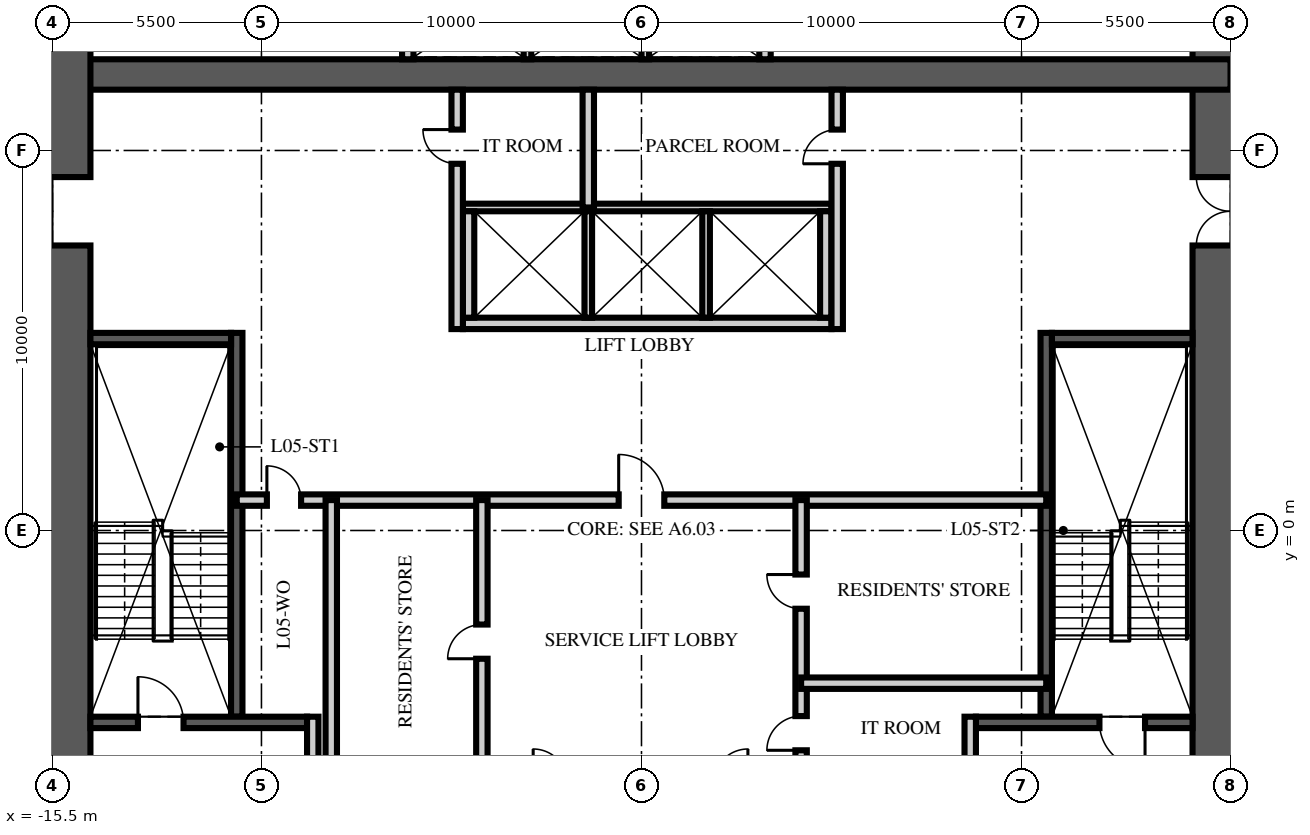
"""IFC4 building model, lengths in metres.
Left out: names, types, materials, properties, quantities, classifications, styles, units other than length and angle.
Written with IfcOpenShell. Run it as: python <this file> out.ifc"""

import sys

from ifc_helpers import new_model, si_unit, direction, frame, frame_2d, origin, place, context, subcontext, project, spatial, rectangle, extrude, element, fill, save


model = new_model("IFC4")
c1 = context("Model", 3, precision=1e-05, world=origin(), true_north=direction((0.0, 1.0)))
c2 = subcontext(c1, "Body", "Model", "MODEL_VIEW")
j1 = project(units=[si_unit("LENGTHUNIT", "METRE"), si_unit("PLANEANGLEUNIT", "RADIAN")], contexts=[c1])
p1 = place(None, origin())
s1 = spatial("IfcSite", under=j1, at=p1, CompositionType="ELEMENT")
p2 = place(p1, origin())
s2 = spatial("IfcBuilding", under=s1, at=p2, CompositionType="ELEMENT")
p3 = place(p2, frame((0.0, 0.0, 24.75)))
s3 = spatial("IfcBuildingStorey", under=s2, at=p3, CompositionType="ELEMENT", Elevation=24.75)
p4 = place(p3, frame((15.5, -15.5, -0.25), z_axis=(0.0, 0.0, 1.0), x_axis=(0.0, 1.0, 0.0)))
e1 = element("IfcWall", 1, at=p4, inside=s3, PredefinedType="SHEAR", context=c2, shape_type="SweptSolid", body=[
    extrude(rectangle(XDim=31.0, YDim=2.0, at=frame_2d((15.5, 0.0))), origin(), (0.0, 0.0, 1.0), 3.75),
])
p5 = place(p4, frame((6.5, 0.0, 0.25)))
e2 = element("IfcOpeningElement", 2, at=p5, cuts=e1, PredefinedType="OPENING", context=c2, shape_type="SweptSolid", body=[
    extrude(rectangle(XDim=1.2, YDim=2.1, at=frame_2d((0.6, 1.05))), frame((0.0, 1.01, 0.0), z_axis=(0.0, -1.0, 0.0), x_axis=(1.0, 0.0, 0.0)), (0.0, 0.0, 1.0), 2.02),
])
p6 = place(p4, frame((23.0, 0.0, 0.25)))
e3 = element("IfcOpeningElement", 3, at=p6, cuts=e1, PredefinedType="OPENING", context=c2, shape_type="SweptSolid", body=[
    extrude(rectangle(XDim=1.8, YDim=2.1, at=frame_2d((0.9, 1.05))), frame((0.0, 1.01, 0.0), z_axis=(0.0, -1.0, 0.0), x_axis=(1.0, 0.0, 0.0)), (0.0, 0.0, 1.0), 2.02),
])
p7 = place(p3, frame((-15.5, 12.0, -0.25), z_axis=(0.0, 0.0, 1.0), x_axis=(1.0, 0.0, 0.0)))
e4 = element("IfcWall", 4, at=p7, inside=s3, PredefinedType="SHEAR", context=c2, shape_type="SweptSolid", body=[
    extrude(rectangle(XDim=31.0, YDim=0.8, at=frame_2d((15.5, 0.0))), origin(), (0.0, 0.0, 1.0), 3.75),
])
p8 = place(p3, frame((-15.5, -15.5, -0.25), z_axis=(0.0, 0.0, 1.0), x_axis=(0.0, 1.0, 0.0)))
e5 = element("IfcWall", 5, at=p8, inside=s3, PredefinedType="SHEAR", context=c2, shape_type="SweptSolid", body=[
    extrude(rectangle(XDim=31.0, YDim=2.0, at=frame_2d((15.5, 0.0))), origin(), (0.0, 0.0, 1.0), 3.75),
])
p9 = place(p8, frame((6.5, 0.0, 0.25)))
e6 = element("IfcOpeningElement", 6, at=p9, cuts=e5, PredefinedType="OPENING", context=c2, shape_type="SweptSolid", body=[
    extrude(rectangle(XDim=1.2, YDim=2.1, at=frame_2d((0.6, 1.05))), frame((0.0, 1.01, 0.0), z_axis=(0.0, -1.0, 0.0), x_axis=(1.0, 0.0, 0.0)), (0.0, 0.0, 1.0), 2.02),
])
p10 = place(p8, frame((23.0, 0.0, 0.25)))
e7 = element("IfcOpeningElement", 7, at=p10, cuts=e5, PredefinedType="OPENING", context=c2, shape_type="SweptSolid", body=[
    extrude(rectangle(XDim=1.8, YDim=2.1, at=frame_2d((0.9, 1.05))), frame((0.0, 1.01, 0.0), z_axis=(0.0, -1.0, 0.0), x_axis=(1.0, 0.0, 0.0)), (0.0, 0.0, 1.0), 2.02),
])
p11 = place(p3, frame((-10.65, -4.9, 0.0), z_axis=(0.0, 0.0, 1.0), x_axis=(0.0, 1.0, 0.0)))
e8 = element("IfcWall", 8, at=p11, inside=s3, PredefinedType="SOLIDWALL", context=c2, shape_type="SweptSolid", body=[
    extrude(rectangle(XDim=10.1, YDim=0.3, at=frame_2d((5.05, 0.0))), origin(), (0.0, 0.0, 1.0), 3.5),
])
p12 = place(p3, frame((-14.5, -5.05, 0.0), z_axis=(0.0, 0.0, 1.0), x_axis=(1.0, 0.0, 0.0)))
e9 = element("IfcWall", 9, at=p12, inside=s3, PredefinedType="SOLIDWALL", context=c2, shape_type="SweptSolid", body=[
    extrude(rectangle(XDim=5.7, YDim=0.3, at=frame_2d((2.85, 0.0))), origin(), (0.0, 0.0, 1.0), 3.5),
])
p13 = place(p12, frame((1.25, 0.0, 0.0)))
e10 = element("IfcOpeningElement", 10, at=p13, cuts=e9, PredefinedType="OPENING", context=c2, shape_type="SweptSolid", body=[
    extrude(rectangle(XDim=1.2, YDim=2.1, at=frame_2d((0.6, 1.05))), frame((0.0, 0.16, 0.0), z_axis=(0.0, -1.0, 0.0), x_axis=(1.0, 0.0, 0.0)), (0.0, 0.0, 1.0), 0.32),
])
p14 = place(p3, frame((-14.5, 5.05, 0.0), z_axis=(0.0, 0.0, 1.0), x_axis=(1.0, 0.0, 0.0)))
e11 = element("IfcWall", 11, at=p14, inside=s3, PredefinedType="SOLIDWALL", context=c2, shape_type="SweptSolid", body=[
    extrude(rectangle(XDim=3.7, YDim=0.3, at=frame_2d((1.85, 0.0))), origin(), (0.0, 0.0, 1.0), 3.5),
])
p15 = place(p3, frame((-8.65, -11.6, 0.0), z_axis=(0.0, 0.0, 1.0), x_axis=(0.0, 1.0, 0.0)))
e12 = element("IfcWall", 12, at=p15, inside=s3, PredefinedType="PARTITIONING", context=c2, shape_type="SweptSolid", body=[
    extrude(rectangle(XDim=6.7, YDim=0.3, at=frame_2d((3.35, 0.0))), origin(), (0.0, 0.0, 1.0), 3.5),
])
p16 = place(p15, frame((2.85, 0.0, 0.0)))
e13 = element("IfcOpeningElement", 13, at=p16, cuts=e12, PredefinedType="OPENING", context=c2, shape_type="SweptSolid", body=[
    extrude(rectangle(XDim=1.1, YDim=2.1, at=frame_2d((0.55, 1.05))), frame((0.0, 0.16, 0.0), z_axis=(0.0, -1.0, 0.0), x_axis=(1.0, 0.0, 0.0)), (0.0, 0.0, 1.0), 0.32),
])
p17 = place(p3, frame((10.65, -4.9, 0.0), z_axis=(0.0, 0.0, 1.0), x_axis=(0.0, 1.0, 0.0)))
e14 = element("IfcWall", 14, at=p17, inside=s3, PredefinedType="SOLIDWALL", context=c2, shape_type="SweptSolid", body=[
    extrude(rectangle(XDim=10.1, YDim=0.3, at=frame_2d((5.05, 0.0))), origin(), (0.0, 0.0, 1.0), 3.5),
])
p18 = place(p3, frame((14.5, -5.05, 0.0), z_axis=(0.0, 0.0, 1.0), x_axis=(-1.0, 0.0, 0.0)))
e15 = element("IfcWall", 15, at=p18, inside=s3, PredefinedType="SOLIDWALL", context=c2, shape_type="SweptSolid", body=[
    extrude(rectangle(XDim=5.7, YDim=0.3, at=frame_2d((2.85, 0.0))), origin(), (0.0, 0.0, 1.0), 3.5),
])
p19 = place(p18, frame((1.25, 0.0, 0.0)))
e16 = element("IfcOpeningElement", 16, at=p19, cuts=e15, PredefinedType="OPENING", context=c2, shape_type="SweptSolid", body=[
    extrude(rectangle(XDim=1.2, YDim=2.1, at=frame_2d((0.6, 1.05))), frame((0.0, 0.16, 0.0), z_axis=(0.0, -1.0, 0.0), x_axis=(1.0, 0.0, 0.0)), (0.0, 0.0, 1.0), 0.32),
])
p20 = place(p3, frame((14.5, 5.05, 0.0), z_axis=(0.0, 0.0, 1.0), x_axis=(-1.0, 0.0, 0.0)))
e17 = element("IfcWall", 17, at=p20, inside=s3, PredefinedType="SOLIDWALL", context=c2, shape_type="SweptSolid", body=[
    extrude(rectangle(XDim=3.7, YDim=0.3, at=frame_2d((1.85, 0.0))), origin(), (0.0, 0.0, 1.0), 3.5),
])
p21 = place(p3, frame((8.65, -11.6, 0.0), z_axis=(0.0, 0.0, 1.0), x_axis=(0.0, 1.0, 0.0)))
e18 = element("IfcWall", 18, at=p21, inside=s3, PredefinedType="PARTITIONING", context=c2, shape_type="SweptSolid", body=[
    extrude(rectangle(XDim=6.7, YDim=0.3, at=frame_2d((3.35, 0.0))), origin(), (0.0, 0.0, 1.0), 3.5),
])
p22 = place(p21, frame((2.85, 0.0, 0.0)))
e19 = element("IfcOpeningElement", 19, at=p22, cuts=e18, PredefinedType="OPENING", context=c2, shape_type="SweptSolid", body=[
    extrude(rectangle(XDim=1.1, YDim=2.1, at=frame_2d((0.55, 1.05))), frame((0.0, 0.16, 0.0), z_axis=(0.0, -1.0, 0.0), x_axis=(1.0, 0.0, 0.0)), (0.0, 0.0, 1.0), 0.32),
])
p23 = place(p3, frame((-4.7, 5.45, 0.0), z_axis=(0.0, 0.0, 1.0), x_axis=(1.0, 0.0, 0.0)))
e20 = element("IfcWall", 20, at=p23, inside=s3, PredefinedType="PARTITIONING", context=c2, shape_type="SweptSolid", body=[
    extrude(rectangle(XDim=9.7, YDim=0.3, at=frame_2d((4.85, 0.0))), origin(), (0.0, 0.0, 1.0), 3.5),
])
p24 = place(p3, frame((-4.7, 8.5, 0.0), z_axis=(0.0, 0.0, 1.0), x_axis=(1.0, 0.0, 0.0)))
e21 = element("IfcWall", 21, at=p24, inside=s3, PredefinedType="PARTITIONING", context=c2, shape_type="SweptSolid", body=[
    extrude(rectangle(XDim=9.7, YDim=0.2, at=frame_2d((4.85, 0.0))), origin(), (0.0, 0.0, 1.0), 3.5),
])
for number, where, z_axis, x_axis in (
    (22, (-4.55, 5.6, 0.0), (0.0, 0.0, 1.0), (0.0, 1.0, 0.0)),
    (23, (4.85, 5.6, 0.0), (0.0, 0.0, 1.0), (0.0, 1.0, 0.0)),
):
    element("IfcWall", number, at=place(p3, frame(where, z_axis=z_axis, x_axis=x_axis)), inside=s3, PredefinedType="PARTITIONING", context=c2, shape_type="SweptSolid", body=[
        extrude(rectangle(XDim=2.8, YDim=0.3, at=frame_2d((1.4, 0.0))), origin(), (0.0, 0.0, 1.0), 3.5),
    ])
for number, where, z_axis, x_axis in (
    (24, (-1.4, 5.6, 0.0), (0.0, 0.0, 1.0), (0.0, 1.0, 0.0)),
    (25, (1.7, 5.6, 0.0), (0.0, 0.0, 1.0), (0.0, 1.0, 0.0)),
):
    element("IfcWall", number, at=place(p3, frame(where, z_axis=z_axis, x_axis=x_axis)), inside=s3, PredefinedType="PARTITIONING", context=c2, shape_type="SweptSolid", body=[
        extrude(rectangle(XDim=2.8, YDim=0.2, at=frame_2d((1.4, 0.0))), origin(), (0.0, 0.0, 1.0), 3.5),
    ])
for number, where, z_axis, x_axis in (
    (26, (-6.15, 12.4, 0.0), (0.0, 0.0, 1.0), (0.0, 1.0, 0.0)),
    (27, (3.25, 12.4, 0.0), (0.0, 0.0, 1.0), (0.0, 1.0, 0.0)),
):
    element("IfcWall", number, at=place(p3, frame(where, z_axis=z_axis, x_axis=x_axis)), inside=s3, PredefinedType="PARTITIONING", context=c2, shape_type="SweptSolid", body=[
        extrude(rectangle(XDim=2.1, YDim=0.3, at=frame_2d((1.05, 0.0))), origin(), (0.0, 0.0, 1.0), 3.5),
    ])
for number, where, z_axis, x_axis in (
    (28, (-3.0, 12.4, 0.0), (0.0, 0.0, 1.0), (0.0, 1.0, 0.0)),
    (29, (0.1, 12.4, 0.0), (0.0, 0.0, 1.0), (0.0, 1.0, 0.0)),
):
    element("IfcWall", number, at=place(p3, frame(where, z_axis=z_axis, x_axis=x_axis)), inside=s3, PredefinedType="PARTITIONING", context=c2, shape_type="SweptSolid", body=[
        extrude(rectangle(XDim=2.1, YDim=0.2, at=frame_2d((1.05, 0.0))), origin(), (0.0, 0.0, 1.0), 3.5),
    ])
p25 = place(p3, frame((-10.65, 0.8, 0.0), z_axis=(0.0, 0.0, 1.0), x_axis=(1.0, 0.0, 0.0)))
e30 = element("IfcWall", 30, at=p25, inside=s3, PredefinedType="PARTITIONING", context=c2, shape_type="SweptSolid", body=[
    extrude(rectangle(XDim=21.3, YDim=0.3, at=frame_2d((10.65, 0.0))), origin(), (0.0, 0.0, 1.0), 3.5),
])
p26 = place(p25, frame((10.05, 0.0, 0.0)))
e31 = element("IfcOpeningElement", 31, at=p26, cuts=e30, PredefinedType="OPENING", context=c2, shape_type="SweptSolid", body=[
    extrude(rectangle(XDim=1.2, YDim=2.1, at=frame_2d((0.6, 1.05))), frame((0.0, 0.16, 0.0), z_axis=(0.0, -1.0, 0.0), x_axis=(1.0, 0.0, 0.0)), (0.0, 0.0, 1.0), 0.32),
])
p27 = place(p25, frame((0.793, 0.0, 0.0)))
e32 = element("IfcOpeningElement", 32, at=p27, cuts=e30, PredefinedType="OPENING", context=c2, shape_type="SweptSolid", body=[
    extrude(rectangle(XDim=0.9, YDim=2.1, at=frame_2d((0.45, 1.05))), frame((0.0, 0.16, 0.0), z_axis=(0.0, -1.0, 0.0), x_axis=(1.0, 0.0, 0.0)), (0.0, 0.0, 1.0), 0.32),
])
p28 = place(p3, frame((-4.2, -6.65, 0.0), z_axis=(0.0, 0.0, 1.0), x_axis=(0.0, 1.0, 0.0)))
e33 = element("IfcWall", 33, at=p28, inside=s3, PredefinedType="PARTITIONING", context=c2, shape_type="SweptSolid", body=[
    extrude(rectangle(XDim=7.45, YDim=0.3, at=frame_2d((3.725, 0.0))), origin(), (0.0, 0.0, 1.0), 3.5),
])
p29 = place(p28, frame((3.275, 0.0, 0.0)))
e34 = element("IfcOpeningElement", 34, at=p29, cuts=e33, PredefinedType="OPENING", context=c2, shape_type="SweptSolid", body=[
    extrude(rectangle(XDim=0.9, YDim=2.1, at=frame_2d((0.45, 1.05))), frame((0.0, 0.16, 0.0), z_axis=(0.0, -1.0, 0.0), x_axis=(1.0, 0.0, 0.0)), (0.0, 0.0, 1.0), 0.32),
])
p30 = place(p3, frame((4.2, -6.65, 0.0), z_axis=(0.0, 0.0, 1.0), x_axis=(0.0, 1.0, 0.0)))
e35 = element("IfcWall", 35, at=p30, inside=s3, PredefinedType="PARTITIONING", context=c2, shape_type="SweptSolid", body=[
    extrude(rectangle(XDim=7.45, YDim=0.3, at=frame_2d((3.725, 0.0))), origin(), (0.0, 0.0, 1.0), 3.5),
])
p31 = place(p30, frame((0.866, 0.0, 0.0)))
e36 = element("IfcOpeningElement", 36, at=p31, cuts=e35, PredefinedType="OPENING", context=c2, shape_type="SweptSolid", body=[
    extrude(rectangle(XDim=0.9, YDim=2.1, at=frame_2d((0.45, 1.05))), frame((0.0, 0.16, 0.0), z_axis=(0.0, -1.0, 0.0), x_axis=(1.0, 0.0, 0.0)), (0.0, 0.0, 1.0), 0.32),
])
p32 = place(p30, frame((4.591, 0.0, 0.0)))
e37 = element("IfcOpeningElement", 37, at=p32, cuts=e35, PredefinedType="OPENING", context=c2, shape_type="SweptSolid", body=[
    extrude(rectangle(XDim=0.9, YDim=2.1, at=frame_2d((0.45, 1.05))), frame((0.0, 0.16, 0.0), z_axis=(0.0, -1.0, 0.0), x_axis=(1.0, 0.0, 0.0)), (0.0, 0.0, 1.0), 0.32),
])
p33 = place(p3, frame((-8.163, -6.65, 0.0), z_axis=(0.0, 0.0, 1.0), x_axis=(0.0, 1.0, 0.0)))
e38 = element("IfcWall", 38, at=p33, inside=s3, PredefinedType="PARTITIONING", context=c2, shape_type="SweptSolid", body=[
    extrude(rectangle(XDim=7.45, YDim=0.3, at=frame_2d((3.725, 0.0))), origin(), (0.0, 0.0, 1.0), 3.5),
])
p34 = place(p3, frame((10.65, -4.018, 0.0), z_axis=(0.0, 0.0, 1.0), x_axis=(-1.0, 0.0, 0.0)))
e39 = element("IfcWall", 39, at=p34, inside=s3, PredefinedType="PARTITIONING", context=c2, shape_type="SweptSolid", body=[
    extrude(rectangle(XDim=6.45, YDim=0.3, at=frame_2d((3.225, 0.0))), origin(), (0.0, 0.0, 1.0), 3.5),
])
p35 = place(p3, frame((-4.85, 5.3, 0.0), z_axis=(0.0, 0.0, 1.0), x_axis=(0.0, 1.0, 0.0)))
e40 = element("IfcWall", 40, at=p35, inside=s3, PredefinedType="PARTITIONING", context=c2, shape_type="SweptSolid", body=[
    extrude(rectangle(XDim=6.3, YDim=0.3, at=frame_2d((3.15, 0.0))), origin(), (0.0, 0.0, 1.0), 3.5),
])
p36 = place(p35, frame((4.35, 0.0, 0.0)))
e41 = element("IfcOpeningElement", 41, at=p36, cuts=e40, PredefinedType="OPENING", context=c2, shape_type="SweptSolid", body=[
    extrude(rectangle(XDim=0.9, YDim=2.1, at=frame_2d((0.45, 1.05))), frame((0.0, 0.16, 0.0), z_axis=(0.0, -1.0, 0.0), x_axis=(1.0, 0.0, 0.0)), (0.0, 0.0, 1.0), 0.32),
])
p37 = place(p3, frame((5.15, 5.3, 0.0), z_axis=(0.0, 0.0, 1.0), x_axis=(0.0, 1.0, 0.0)))
e42 = element("IfcWall", 42, at=p37, inside=s3, PredefinedType="PARTITIONING", context=c2, shape_type="SweptSolid", body=[
    extrude(rectangle(XDim=6.3, YDim=0.3, at=frame_2d((3.15, 0.0))), origin(), (0.0, 0.0, 1.0), 3.5),
])
p38 = place(p37, frame((4.35, 0.0, 0.0)))
e43 = element("IfcOpeningElement", 43, at=p38, cuts=e42, PredefinedType="OPENING", context=c2, shape_type="SweptSolid", body=[
    extrude(rectangle(XDim=0.9, YDim=2.1, at=frame_2d((0.45, 1.05))), frame((0.0, 0.16, 0.0), z_axis=(0.0, -1.0, 0.0), x_axis=(1.0, 0.0, 0.0)), (0.0, 0.0, 1.0), 0.32),
])
p39 = place(p3, frame((-1.4, 8.5, 0.0), z_axis=(0.0, 0.0, 1.0), x_axis=(0.0, 1.0, 0.0)))
e44 = element("IfcWall", 44, at=p39, inside=s3, PredefinedType="PARTITIONING", context=c2, shape_type="SweptSolid", body=[
    extrude(rectangle(XDim=3.1, YDim=0.3, at=frame_2d((1.55, 0.0))), origin(), (0.0, 0.0, 1.0), 3.5),
])
p40 = place(p13, origin())
e45 = element("IfcDoor", 45, at=p40, inside=s3, OperationType="SINGLE_SWING_LEFT", PredefinedType="DOOR", context=c2, shape_type="SweptSolid", body=[
    extrude(rectangle(XDim=1.2, YDim=2.1, at=frame_2d((0.6, 1.05))), frame((0.0, 0.025, 0.0), z_axis=(0.0, -1.0, 0.0), x_axis=(1.0, 0.0, 0.0)), (0.0, 0.0, 1.0), 0.05),
])
fill(e10, e45)
p41 = place(p10, origin())
e46 = element("IfcDoor", 46, at=p41, inside=s3, OperationType="DOUBLE_DOOR_SINGLE_SWING", PredefinedType="DOOR", context=c2, shape_type="SweptSolid", body=[
    extrude(rectangle(XDim=1.8, YDim=2.1, at=frame_2d((0.9, 1.05))), frame((0.0, 0.025, 0.0), z_axis=(0.0, -1.0, 0.0), x_axis=(1.0, 0.0, 0.0)), (0.0, 0.0, 1.0), 0.05),
])
fill(e7, e46)
p42 = place(p19, origin())
e47 = element("IfcDoor", 47, at=p42, inside=s3, OperationType="SINGLE_SWING_LEFT", PredefinedType="DOOR", context=c2, shape_type="SweptSolid", body=[
    extrude(rectangle(XDim=1.2, YDim=2.1, at=frame_2d((0.6, 1.05))), frame((0.0, 0.025, 0.0), z_axis=(0.0, -1.0, 0.0), x_axis=(1.0, 0.0, 0.0)), (0.0, 0.0, 1.0), 0.05),
])
fill(e16, e47)
p43 = place(p6, origin())
e48 = element("IfcDoor", 48, at=p43, inside=s3, OperationType="DOUBLE_DOOR_SINGLE_SWING", PredefinedType="DOOR", context=c2, shape_type="SweptSolid", body=[
    extrude(rectangle(XDim=1.8, YDim=2.1, at=frame_2d((0.9, 1.05))), frame((0.0, 0.025, 0.0), z_axis=(0.0, -1.0, 0.0), x_axis=(1.0, 0.0, 0.0)), (0.0, 0.0, 1.0), 0.05),
])
fill(e3, e48)
p44 = place(p26, origin())
e49 = element("IfcDoor", 49, at=p44, inside=s3, OperationType="SINGLE_SWING_LEFT", PredefinedType="DOOR", context=c2, shape_type="SweptSolid", body=[
    extrude(rectangle(XDim=1.2, YDim=2.1, at=frame_2d((0.6, 1.05))), frame((0.0, 0.025, 0.0), z_axis=(0.0, -1.0, 0.0), x_axis=(1.0, 0.0, 0.0)), (0.0, 0.0, 1.0), 0.05),
])
fill(e31, e49)
p45 = place(p29, origin())
e50 = element("IfcDoor", 50, at=p45, inside=s3, OperationType="SINGLE_SWING_LEFT", PredefinedType="DOOR", context=c2, shape_type="SweptSolid", body=[
    extrude(rectangle(XDim=0.9, YDim=2.1, at=frame_2d((0.45, 1.05))), frame((0.0, 0.025, 0.0), z_axis=(0.0, -1.0, 0.0), x_axis=(1.0, 0.0, 0.0)), (0.0, 0.0, 1.0), 0.05),
])
fill(e34, e50)
p46 = place(p27, origin())
e51 = element("IfcDoor", 51, at=p46, inside=s3, OperationType="SINGLE_SWING_LEFT", PredefinedType="DOOR", context=c2, shape_type="SweptSolid", body=[
    extrude(rectangle(XDim=0.9, YDim=2.1, at=frame_2d((0.45, 1.05))), frame((0.0, 0.025, 0.0), z_axis=(0.0, -1.0, 0.0), x_axis=(1.0, 0.0, 0.0)), (0.0, 0.0, 1.0), 0.05),
])
fill(e32, e51)
p47 = place(p31, origin())
e52 = element("IfcDoor", 52, at=p47, inside=s3, OperationType="SINGLE_SWING_LEFT", PredefinedType="DOOR", context=c2, shape_type="SweptSolid", body=[
    extrude(rectangle(XDim=0.9, YDim=2.1, at=frame_2d((0.45, 1.05))), frame((0.0, 0.025, 0.0), z_axis=(0.0, -1.0, 0.0), x_axis=(1.0, 0.0, 0.0)), (0.0, 0.0, 1.0), 0.05),
])
fill(e36, e52)
p48 = place(p32, origin())
e53 = element("IfcDoor", 53, at=p48, inside=s3, OperationType="SINGLE_SWING_RIGHT", PredefinedType="DOOR", context=c2, shape_type="SweptSolid", body=[
    extrude(rectangle(XDim=0.9, YDim=2.1, at=frame_2d((0.45, 1.05))), frame((0.0, 0.025, 0.0), z_axis=(0.0, -1.0, 0.0), x_axis=(1.0, 0.0, 0.0)), (0.0, 0.0, 1.0), 0.05),
])
fill(e37, e53)
p49 = place(p36, origin())
e54 = element("IfcDoor", 54, at=p49, inside=s3, OperationType="SINGLE_SWING_RIGHT", PredefinedType="DOOR", context=c2, shape_type="SweptSolid", body=[
    extrude(rectangle(XDim=0.9, YDim=2.1, at=frame_2d((0.45, 1.05))), frame((0.0, 0.025, 0.0), z_axis=(0.0, -1.0, 0.0), x_axis=(1.0, 0.0, 0.0)), (0.0, 0.0, 1.0), 0.05),
])
fill(e41, e54)
p50 = place(p38, origin())
e55 = element("IfcDoor", 55, at=p50, inside=s3, OperationType="SINGLE_SWING_LEFT", PredefinedType="DOOR", context=c2, shape_type="SweptSolid", body=[
    extrude(rectangle(XDim=0.9, YDim=2.1, at=frame_2d((0.45, 1.05))), frame((0.0, 0.025, 0.0), z_axis=(0.0, -1.0, 0.0), x_axis=(1.0, 0.0, 0.0)), (0.0, 0.0, 1.0), 0.05),
])
fill(e43, e55)
save(model, sys.argv[1])
